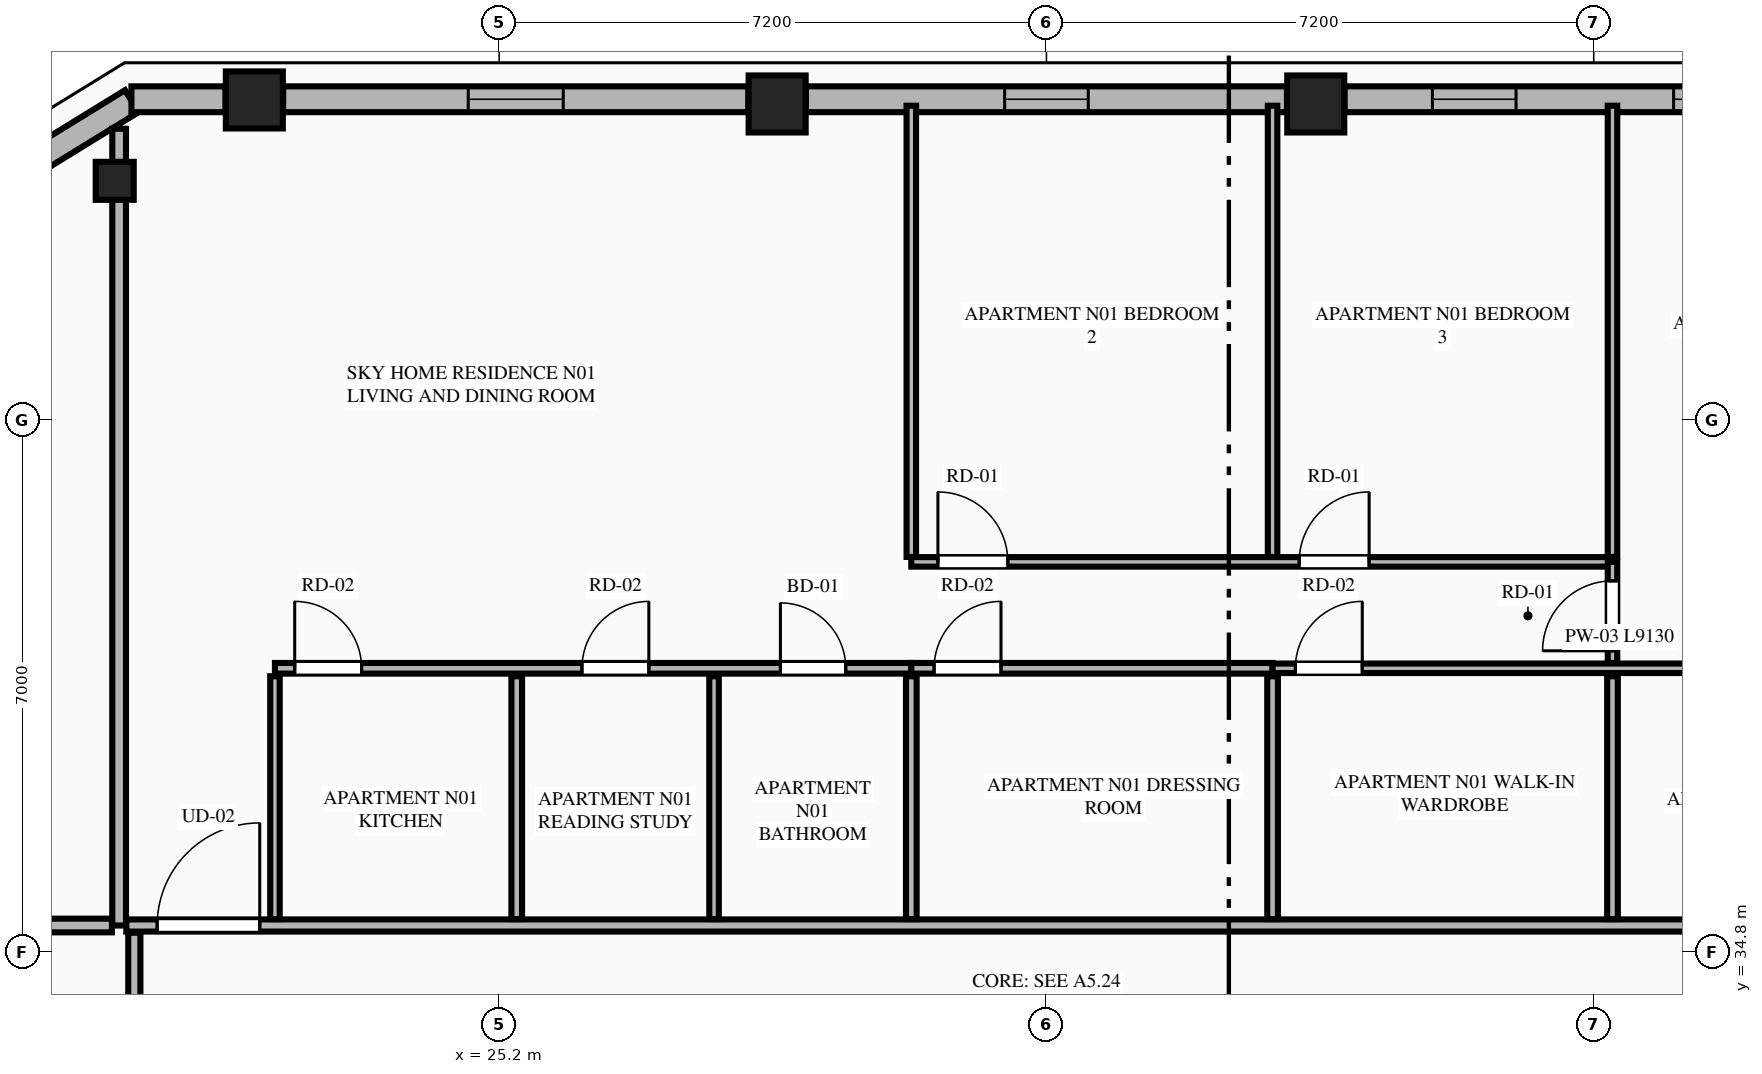
"""IFC4 building model, lengths in metres.
Left out: names, types, materials, properties, quantities, classifications, styles, units other than length and angle.
Written with IfcOpenShell. Run it as: python <this file> out.ifc"""

import sys

from ifc_helpers import new_model, si_unit, direction, frame, frame_2d, origin, origin_2d, place, context, subcontext, project, spatial, rectangle, extrude, element, fill, save


model = new_model("IFC4")
c1 = context("Model", 3, precision=1e-05, world=origin(), true_north=direction((0.0, 1.0)))
c2 = subcontext(c1, "Body", "Model", "MODEL_VIEW")
j1 = project(units=[si_unit("LENGTHUNIT", "METRE"), si_unit("PLANEANGLEUNIT", "RADIAN")], contexts=[c1])
p1 = place(None, origin())
s1 = spatial("IfcSite", under=j1, at=p1, CompositionType="ELEMENT")
p2 = place(p1, origin())
s2 = spatial("IfcBuilding", under=s1, at=p2, CompositionType="ELEMENT")
p3 = place(p2, frame((0.0, 0.0, 214.5)))
s3 = spatial("IfcBuildingStorey", under=s2, at=p3, CompositionType="ELEMENT", Elevation=214.5)
for number, where, z_axis, x_axis in (
    (1, (35.943, 45.958, 0.0), (0.0, 0.0, 1.0), (1.0, 0.0, 0.0)),
    (2, (28.857, 45.958, 0.0), (0.0, 0.0, 1.0), (1.0, 0.0, 0.0)),
    (3, (21.979, 46.011, 0.0), (0.0, 0.0, 1.0), (1.0, 0.0, 0.0)),
):
    element("IfcColumn", number, at=place(p3, frame(where, z_axis=z_axis, x_axis=x_axis)), inside=s3, PredefinedType="COLUMN", context=c2, shape_type="SweptSolid", body=[
        extrude(rectangle(XDim=0.75, YDim=0.75, at=origin_2d()), origin(), (0.0, 0.0, 1.0), 3.55),
    ])
p4 = place(p3, frame((20.142, 44.947, 0.0), z_axis=(0.0, 0.0, 1.0), x_axis=(-0.865230187018, -0.501374833306, 0.0)))
e4 = element("IfcColumn", 4, at=p4, inside=s3, PredefinedType="PILASTER", context=c2, shape_type="SweptSolid", body=[
    extrude(rectangle(XDim=0.5, YDim=0.35, at=origin_2d()), origin(), (0.0, 0.0, 1.0), 3.55),
])
p5 = place(p3, frame((20.367, 45.995, 0.0), z_axis=(0.0, 0.0, 1.0), x_axis=(-0.851713271379, -0.524008113828, 0.0)))
e5 = element("IfcWall", 5, at=p5, inside=s3, PredefinedType="STANDARD", context=c2, shape_type="SweptSolid", body=[
    extrude(rectangle(XDim=1.678, YDim=0.34, at=frame_2d((0.839, 0.0))), origin(), (0.0, 0.0, 1.0), 3.35),
])
p6 = place(p3, frame((42.442, 46.02, 0.0), z_axis=(0.0, 0.0, 1.0), x_axis=(-1.0, 0.0, 0.0)))
e6 = element("IfcWall", 6, at=p6, inside=s3, PredefinedType="STANDARD", context=c2, shape_type="SweptSolid", body=[
    extrude(rectangle(XDim=6.12, YDim=0.34, at=frame_2d((3.06, 0.0))), origin(), (0.0, 0.0, 1.0), 2.883),
])
p7 = place(p6, frame((0.691, 0.0, 0.75)))
e7 = element("IfcOpeningElement", 7, at=p7, cuts=e6, PredefinedType="OPENING", context=c2, shape_type="SweptSolid", body=[
    extrude(rectangle(XDim=1.1, YDim=1.983, at=frame_2d((0.55, 0.991))), frame((0.0, 0.18, 0.0), z_axis=(0.0, -1.0, 0.0), x_axis=(1.0, 0.0, 0.0)), (0.0, 0.0, 1.0), 0.36),
])
p8 = place(p6, frame((3.864, 0.0, 0.75)))
e8 = element("IfcOpeningElement", 8, at=p8, cuts=e6, PredefinedType="OPENING", context=c2, shape_type="SweptSolid", body=[
    extrude(rectangle(XDim=1.1, YDim=1.983, at=frame_2d((0.55, 0.991))), frame((0.0, 0.18, 0.0), z_axis=(0.0, -1.0, 0.0), x_axis=(1.0, 0.0, 0.0)), (0.0, 0.0, 1.0), 0.36),
])
p9 = place(p3, frame((35.564, 46.02, 0.0), z_axis=(0.0, 0.0, 1.0), x_axis=(-1.0, 0.0, 0.0)))
e9 = element("IfcWall", 9, at=p9, inside=s3, PredefinedType="STANDARD", context=c2, shape_type="SweptSolid", body=[
    extrude(rectangle(XDim=6.328, YDim=0.34, at=frame_2d((3.164, 0.0))), origin(), (0.0, 0.0, 1.0), 2.883),
])
p10 = place(p9, frame((2.614, 0.0, 0.75)))
e10 = element("IfcOpeningElement", 10, at=p10, cuts=e9, PredefinedType="OPENING", context=c2, shape_type="SweptSolid", body=[
    extrude(rectangle(XDim=1.1, YDim=1.983, at=frame_2d((0.55, 0.991))), frame((0.0, 0.18, 0.0), z_axis=(0.0, -1.0, 0.0), x_axis=(1.0, 0.0, 0.0)), (0.0, 0.0, 1.0), 0.36),
])
p11 = place(p3, frame((28.478, 46.02, 0.0), z_axis=(0.0, 0.0, 1.0), x_axis=(-1.0, 0.0, 0.0)))
e11 = element("IfcWall", 11, at=p11, inside=s3, PredefinedType="STANDARD", context=c2, shape_type="SweptSolid", body=[
    extrude(rectangle(XDim=6.12, YDim=0.34, at=frame_2d((3.06, 0.0))), origin(), (0.0, 0.0, 1.0), 2.883),
])
p12 = place(p11, frame((2.435, 0.0, 0.75)))
e12 = element("IfcOpeningElement", 12, at=p12, cuts=e11, PredefinedType="OPENING", context=c2, shape_type="SweptSolid", body=[
    extrude(rectangle(XDim=1.25, YDim=1.95, at=frame_2d((0.625, 0.975))), frame((0.0, 0.18, 0.0), z_axis=(0.0, -1.0, 0.0), x_axis=(1.0, 0.0, 0.0)), (0.0, 0.0, 1.0), 0.36),
])
p13 = place(p3, frame((21.6, 46.02, 0.0), z_axis=(0.0, 0.0, 1.0), x_axis=(-1.0, 0.0, 0.0)))
e13 = element("IfcWall", 13, at=p13, inside=s3, PredefinedType="STANDARD", context=c2, shape_type="SweptSolid", body=[
    extrude(rectangle(XDim=1.238, YDim=0.34, at=frame_2d((0.619, 0.0))), origin(), (0.0, 0.0, 1.0), 3.35),
])
p14 = place(p3, frame((20.2, 35.15, 0.0), z_axis=(0.0, 0.0, 1.0), x_axis=(0.0, 1.0, 0.0)))
e14 = element("IfcWall", 14, at=p14, inside=s3, PredefinedType="PARTITIONING", context=c2, shape_type="SweptSolid", body=[
    extrude(rectangle(XDim=10.482, YDim=0.18, at=frame_2d((5.241, 0.0))), origin(), (0.0, 0.0, 1.0), 3.35),
])
p15 = place(p3, frame((20.295, 35.15, 0.0), z_axis=(0.0, 0.0, 1.0), x_axis=(1.0, 0.0, 0.0)))
e15 = element("IfcWall", 15, at=p15, inside=s3, PredefinedType="PARTITIONING", context=c2, shape_type="SweptSolid", body=[
    extrude(rectangle(XDim=24.21, YDim=0.16, at=frame_2d((12.105, 0.0))), origin(), (0.0, 0.0, 1.0), 3.35),
])
p16 = place(p15, frame((0.405, 0.0, 0.0)))
e16 = element("IfcOpeningElement", 16, at=p16, cuts=e15, PredefinedType="OPENING", context=c2, shape_type="SweptSolid", body=[
    extrude(rectangle(XDim=1.35, YDim=2.35, at=frame_2d((0.675, 1.175))), frame((0.0, 0.09, 0.0), z_axis=(0.0, -1.0, 0.0), x_axis=(1.0, 0.0, 0.0)), (0.0, 0.0, 1.0), 0.18),
])
p17 = place(p3, frame((22.25, 35.235, 0.0), z_axis=(0.0, 0.0, 1.0), x_axis=(0.0, 1.0, 0.0)))
e17 = element("IfcWall", 17, at=p17, inside=s3, PredefinedType="PARTITIONING", context=c2, shape_type="SweptSolid", body=[
    extrude(rectangle(XDim=3.194, YDim=0.125, at=frame_2d((1.597, 0.0))), origin(), (0.0, 0.0, 1.0), 2.807),
])
p18 = place(p3, frame((22.25, 38.534, 0.0), z_axis=(0.0, 0.0, 1.0), x_axis=(1.0, 0.0, 0.0)))
e18 = element("IfcWall", 18, at=p18, inside=s3, PredefinedType="PLUMBINGWALL", context=c2, shape_type="SweptSolid", body=[
    extrude(rectangle(XDim=8.372, YDim=0.14, at=frame_2d((4.186, 0.0))), origin(), (0.0, 0.0, 1.0), 3.35),
])
p19 = place(p18, frame((6.65, 0.0, 0.0)))
e19 = element("IfcOpeningElement", 19, at=p19, cuts=e18, PredefinedType="OPENING", context=c2, shape_type="SweptSolid", body=[
    extrude(rectangle(XDim=0.86, YDim=2.1, at=frame_2d((0.43, 1.05))), frame((0.0, 0.08, 0.0), z_axis=(0.0, -1.0, 0.0), x_axis=(1.0, 0.0, 0.0)), (0.0, 0.0, 1.0), 0.16),
])
p20 = place(p18, frame((0.26, 0.0, 0.0)))
e20 = element("IfcOpeningElement", 20, at=p20, cuts=e18, PredefinedType="OPENING", context=c2, shape_type="SweptSolid", body=[
    extrude(rectangle(XDim=0.88, YDim=2.15, at=frame_2d((0.44, 1.075))), frame((0.0, 0.08, 0.0), z_axis=(0.0, -1.0, 0.0), x_axis=(1.0, 0.0, 0.0)), (0.0, 0.0, 1.0), 0.16),
])
p21 = place(p18, frame((4.039, 0.0, 0.0)))
e21 = element("IfcOpeningElement", 21, at=p21, cuts=e18, PredefinedType="OPENING", context=c2, shape_type="SweptSolid", body=[
    extrude(rectangle(XDim=0.88, YDim=2.15, at=frame_2d((0.44, 1.075))), frame((0.0, 0.08, 0.0), z_axis=(0.0, -1.0, 0.0), x_axis=(1.0, 0.0, 0.0)), (0.0, 0.0, 1.0), 0.16),
])
p22 = place(p3, frame((30.622, 38.534, 0.0), z_axis=(0.0, 0.0, 1.0), x_axis=(1.0, 0.0, 0.0)))
e22 = element("IfcWall", 22, at=p22, inside=s3, PredefinedType="PLUMBINGWALL", context=c2, shape_type="SweptSolid", body=[
    extrude(rectangle(XDim=4.753, YDim=0.14, at=frame_2d((2.376, 0.0))), origin(), (0.0, 0.0, 1.0), 3.35),
])
p23 = place(p22, frame((0.3, 0.0, 0.0)))
e23 = element("IfcOpeningElement", 23, at=p23, cuts=e22, PredefinedType="OPENING", context=c2, shape_type="SweptSolid", body=[
    extrude(rectangle(XDim=0.88, YDim=2.15, at=frame_2d((0.44, 1.075))), frame((0.0, 0.08, 0.0), z_axis=(0.0, -1.0, 0.0), x_axis=(1.0, 0.0, 0.0)), (0.0, 0.0, 1.0), 0.16),
])
p24 = place(p3, frame((35.375, 38.534, 0.0), z_axis=(0.0, 0.0, 1.0), x_axis=(1.0, 0.0, 0.0)))
e24 = element("IfcWall", 24, at=p24, inside=s3, PredefinedType="PARTITIONING", context=c2, shape_type="SweptSolid", body=[
    extrude(rectangle(XDim=9.13, YDim=0.125, at=frame_2d((4.565, 0.0))), origin(), (0.0, 0.0, 1.0), 3.35),
])
p25 = place(p24, frame((6.376, 0.0, 0.0)))
e25 = element("IfcOpeningElement", 25, at=p25, cuts=e24, PredefinedType="OPENING", context=c2, shape_type="SweptSolid", body=[
    extrude(rectangle(XDim=0.86, YDim=2.1, at=frame_2d((0.43, 1.05))), frame((0.0, 0.073, 0.0), z_axis=(0.0, -1.0, 0.0), x_axis=(1.0, 0.0, 0.0)), (0.0, 0.0, 1.0), 0.145),
])
p26 = place(p24, frame((0.3, 0.0, 0.0)))
e26 = element("IfcOpeningElement", 26, at=p26, cuts=e24, PredefinedType="OPENING", context=c2, shape_type="SweptSolid", body=[
    extrude(rectangle(XDim=0.88, YDim=2.15, at=frame_2d((0.44, 1.075))), frame((0.0, 0.073, 0.0), z_axis=(0.0, -1.0, 0.0), x_axis=(1.0, 0.0, 0.0)), (0.0, 0.0, 1.0), 0.145),
])
p27 = place(p3, frame((25.431, 35.235, 0.0), z_axis=(0.0, 0.0, 1.0), x_axis=(0.0, 1.0, 0.0)))
e27 = element("IfcWall", 27, at=p27, inside=s3, PredefinedType="PLUMBINGWALL", context=c2, shape_type="SweptSolid", body=[
    extrude(rectangle(XDim=3.194, YDim=0.14, at=frame_2d((1.597, 0.0))), origin(), (0.0, 0.0, 1.0), 3.35),
])
p28 = place(p3, frame((28.027, 35.235, 0.0), z_axis=(0.0, 0.0, 1.0), x_axis=(0.0, 1.0, 0.0)))
e28 = element("IfcWall", 28, at=p28, inside=s3, PredefinedType="PARTITIONING", context=c2, shape_type="SweptSolid", body=[
    extrude(rectangle(XDim=3.194, YDim=0.125, at=frame_2d((1.597, 0.0))), origin(), (0.0, 0.0, 1.0), 3.35),
])
p29 = place(p3, frame((30.622, 39.999, 0.0), z_axis=(0.0, 0.0, 1.0), x_axis=(0.0, 1.0, 0.0)))
e29 = element("IfcWall", 29, at=p29, inside=s3, PredefinedType="PARTITIONING", context=c2, shape_type="SweptSolid", body=[
    extrude(rectangle(XDim=5.936, YDim=0.125, at=frame_2d((2.968, 0.0))), origin(), (0.0, 0.0, 1.0), 3.35),
])
p30 = place(p3, frame((30.622, 39.934, 0.0), z_axis=(0.0, 0.0, 1.0), x_axis=(1.0, 0.0, 0.0)))
e30 = element("IfcWall", 30, at=p30, inside=s3, PredefinedType="PARTITIONING", context=c2, shape_type="SweptSolid", body=[
    extrude(rectangle(XDim=9.225, YDim=0.125, at=frame_2d((4.612, 0.0))), origin(), (0.0, 0.0, 1.0), 3.35),
])
p31 = place(p30, frame((0.35, 0.0, 0.0)))
e31 = element("IfcOpeningElement", 31, at=p31, cuts=e30, PredefinedType="OPENING", context=c2, shape_type="SweptSolid", body=[
    extrude(rectangle(XDim=0.92, YDim=2.15, at=frame_2d((0.46, 1.075))), frame((0.0, 0.073, 0.0), z_axis=(0.0, -1.0, 0.0), x_axis=(1.0, 0.0, 0.0)), (0.0, 0.0, 1.0), 0.145),
])
p32 = place(p30, frame((5.103, 0.0, 0.0)))
e32 = element("IfcOpeningElement", 32, at=p32, cuts=e30, PredefinedType="OPENING", context=c2, shape_type="SweptSolid", body=[
    extrude(rectangle(XDim=0.92, YDim=2.15, at=frame_2d((0.46, 1.075))), frame((0.0, 0.073, 0.0), z_axis=(0.0, -1.0, 0.0), x_axis=(1.0, 0.0, 0.0)), (0.0, 0.0, 1.0), 0.145),
])
p33 = place(p3, frame((39.847, 38.604, 0.0), z_axis=(0.0, 0.0, 1.0), x_axis=(0.0, 1.0, 0.0)))
e33 = element("IfcWall", 33, at=p33, inside=s3, PredefinedType="PARTITIONING", context=c2, shape_type="SweptSolid", body=[
    extrude(rectangle(XDim=1.33, YDim=0.125, at=frame_2d((0.665, 0.0))), origin(), (0.0, 0.0, 1.0), 3.35),
])
p34 = place(p33, frame((0.16, 0.0, 0.0)))
e34 = element("IfcOpeningElement", 34, at=p34, cuts=e33, PredefinedType="OPENING", context=c2, shape_type="SweptSolid", body=[
    extrude(rectangle(XDim=0.92, YDim=2.15, at=frame_2d((0.46, 1.075))), frame((0.0, 0.073, 0.0), z_axis=(0.0, -1.0, 0.0), x_axis=(1.0, 0.0, 0.0)), (0.0, 0.0, 1.0), 0.145),
])
for number, where, z_axis, x_axis in (
    (35, (30.622, 35.235, 0.0), (0.0, 0.0, 1.0), (0.0, 1.0, 0.0)),
    (36, (35.375, 35.235, 0.0), (0.0, 0.0, 1.0), (0.0, 1.0, 0.0)),
):
    element("IfcWall", number, at=place(p3, frame(where, z_axis=z_axis, x_axis=x_axis)), inside=s3, PredefinedType="PLUMBINGWALL", context=c2, shape_type="SweptSolid", body=[
        extrude(rectangle(XDim=3.194, YDim=0.14, at=frame_2d((1.597, 0.0))), origin(), (0.0, 0.0, 1.0), 3.35),
    ])
for number, where, z_axis, x_axis in (
    (37, (35.375, 39.999, 0.0), (0.0, 0.0, 1.0), (0.0, 1.0, 0.0)),
    (38, (39.847, 39.999, 0.0), (0.0, 0.0, 1.0), (0.0, 1.0, 0.0)),
):
    element("IfcWall", number, at=place(p3, frame(where, z_axis=z_axis, x_axis=x_axis)), inside=s3, PredefinedType="PARTITIONING", context=c2, shape_type="SweptSolid", body=[
        extrude(rectangle(XDim=5.936, YDim=0.125, at=frame_2d((2.968, 0.0))), origin(), (0.0, 0.0, 1.0), 3.35),
    ])
p35 = place(p3, frame((39.847, 35.235, 0.0), z_axis=(0.0, 0.0, 1.0), x_axis=(0.0, 1.0, 0.0)))
e39 = element("IfcWall", 39, at=p35, inside=s3, PredefinedType="PLUMBINGWALL", context=c2, shape_type="SweptSolid", body=[
    extrude(rectangle(XDim=3.194, YDim=0.14, at=frame_2d((1.597, 0.0))), origin(), (0.0, 0.0, 1.0), 3.35),
])
p36 = place(p3, frame((14.11, 35.15, 0.0), z_axis=(0.0, 0.0, 1.0), x_axis=(1.0, 0.0, 0.0)))
e40 = element("IfcWall", 40, at=p36, inside=s3, PredefinedType="PARTITIONING", context=c2, shape_type="SweptSolid", body=[
    extrude(rectangle(XDim=5.995, YDim=0.18, at=frame_2d((2.998, 0.0))), origin(), (0.0, 0.0, 1.0), 3.35),
])
p37 = place(p3, frame((20.4, 25.417, 0.0), z_axis=(0.0, 0.0, 1.0), x_axis=(0.0, 1.0, 0.0)))
e41 = element("IfcWall", 41, at=p37, inside=s3, PredefinedType="PARTITIONING", context=c2, shape_type="SweptSolid", body=[
    extrude(rectangle(XDim=9.638, YDim=0.16, at=frame_2d((4.819, 0.0))), origin(), (0.0, 0.0, 1.0), 3.35),
])
p38 = place(p37, frame((0.4, 0.0, 0.0)))
e42 = element("IfcOpeningElement", 42, at=p38, cuts=e41, PredefinedType="OPENING", context=c2, shape_type="SweptSolid", body=[
    extrude(rectangle(XDim=1.02, YDim=2.25, at=frame_2d((0.51, 1.125))), frame((0.0, 0.09, 0.0), z_axis=(0.0, -1.0, 0.0), x_axis=(1.0, 0.0, 0.0)), (0.0, 0.0, 1.0), 0.18),
])
p39 = place(p7, origin())
e43 = element("IfcWindow", 43, at=p39, inside=s3, PartitioningType="SINGLE_PANEL", PredefinedType="WINDOW", context=c2, shape_type="SweptSolid", body=[
    extrude(rectangle(XDim=1.1, YDim=1.983, at=frame_2d((0.55, 0.991))), frame((0.0, 0.03, 0.0), z_axis=(0.0, -1.0, 0.0), x_axis=(1.0, 0.0, 0.0)), (0.0, 0.0, 1.0), 0.06),
])
fill(e7, e43)
p40 = place(p10, origin())
e44 = element("IfcWindow", 44, at=p40, inside=s3, PartitioningType="SINGLE_PANEL", PredefinedType="WINDOW", context=c2, shape_type="SweptSolid", body=[
    extrude(rectangle(XDim=1.1, YDim=1.983, at=frame_2d((0.55, 0.991))), frame((0.0, 0.03, 0.0), z_axis=(0.0, -1.0, 0.0), x_axis=(1.0, 0.0, 0.0)), (0.0, 0.0, 1.0), 0.06),
])
fill(e10, e44)
p41 = place(p12, origin())
e45 = element("IfcWindow", 45, at=p41, inside=s3, PartitioningType="SINGLE_PANEL", PredefinedType="WINDOW", context=c2, shape_type="SweptSolid", body=[
    extrude(rectangle(XDim=1.25, YDim=1.95, at=frame_2d((0.625, 0.975))), frame((0.0, 0.03, 0.0), z_axis=(0.0, -1.0, 0.0), x_axis=(1.0, 0.0, 0.0)), (0.0, 0.0, 1.0), 0.06),
])
fill(e12, e45)
p42 = place(p19, origin())
e46 = element("IfcDoor", 46, at=p42, inside=s3, OperationType="SINGLE_SWING_LEFT", PredefinedType="DOOR", context=c2, shape_type="SweptSolid", body=[
    extrude(rectangle(XDim=0.86, YDim=2.1, at=frame_2d((0.43, 1.05))), frame((0.0, 0.025, 0.0), z_axis=(0.0, -1.0, 0.0), x_axis=(1.0, 0.0, 0.0)), (0.0, 0.0, 1.0), 0.05),
])
fill(e19, e46)
p43 = place(p16, origin())
e47 = element("IfcDoor", 47, at=p43, inside=s3, OperationType="SINGLE_SWING_RIGHT", PredefinedType="DOOR", context=c2, shape_type="SweptSolid", body=[
    extrude(rectangle(XDim=1.35, YDim=2.35, at=frame_2d((0.675, 1.175))), frame((0.0, 0.025, 0.0), z_axis=(0.0, -1.0, 0.0), x_axis=(1.0, 0.0, 0.0)), (0.0, 0.0, 1.0), 0.05),
])
fill(e16, e47)
p44 = place(p20, origin())
e48 = element("IfcDoor", 48, at=p44, inside=s3, OperationType="SINGLE_SWING_LEFT", PredefinedType="DOOR", context=c2, shape_type="SweptSolid", body=[
    extrude(rectangle(XDim=0.88, YDim=2.15, at=frame_2d((0.44, 1.075))), frame((0.0, 0.025, 0.0), z_axis=(0.0, -1.0, 0.0), x_axis=(1.0, 0.0, 0.0)), (0.0, 0.0, 1.0), 0.05),
])
fill(e20, e48)
p45 = place(p21, origin())
e49 = element("IfcDoor", 49, at=p45, inside=s3, OperationType="SINGLE_SWING_RIGHT", PredefinedType="DOOR", context=c2, shape_type="SweptSolid", body=[
    extrude(rectangle(XDim=0.88, YDim=2.15, at=frame_2d((0.44, 1.075))), frame((0.0, 0.025, 0.0), z_axis=(0.0, -1.0, 0.0), x_axis=(1.0, 0.0, 0.0)), (0.0, 0.0, 1.0), 0.05),
])
fill(e21, e49)
p46 = place(p23, origin())
e50 = element("IfcDoor", 50, at=p46, inside=s3, OperationType="SINGLE_SWING_RIGHT", PredefinedType="DOOR", context=c2, shape_type="SweptSolid", body=[
    extrude(rectangle(XDim=0.88, YDim=2.15, at=frame_2d((0.44, 1.075))), frame((0.0, 0.025, 0.0), z_axis=(0.0, -1.0, 0.0), x_axis=(1.0, 0.0, 0.0)), (0.0, 0.0, 1.0), 0.05),
])
fill(e23, e50)
p47 = place(p31, origin())
e51 = element("IfcDoor", 51, at=p47, inside=s3, OperationType="SINGLE_SWING_LEFT", PredefinedType="DOOR", context=c2, shape_type="SweptSolid", body=[
    extrude(rectangle(XDim=0.92, YDim=2.15, at=frame_2d((0.46, 1.075))), frame((0.0, 0.025, 0.0), z_axis=(0.0, -1.0, 0.0), x_axis=(1.0, 0.0, 0.0)), (0.0, 0.0, 1.0), 0.05),
])
fill(e31, e51)
p48 = place(p32, origin())
e52 = element("IfcDoor", 52, at=p48, inside=s3, OperationType="SINGLE_SWING_RIGHT", PredefinedType="DOOR", context=c2, shape_type="SweptSolid", body=[
    extrude(rectangle(XDim=0.92, YDim=2.15, at=frame_2d((0.46, 1.075))), frame((0.0, 0.025, 0.0), z_axis=(0.0, -1.0, 0.0), x_axis=(1.0, 0.0, 0.0)), (0.0, 0.0, 1.0), 0.05),
])
fill(e32, e52)
p49 = place(p34, origin())
e53 = element("IfcDoor", 53, at=p49, inside=s3, OperationType="SINGLE_SWING_LEFT", PredefinedType="DOOR", context=c2, shape_type="SweptSolid", body=[
    extrude(rectangle(XDim=0.92, YDim=2.15, at=frame_2d((0.46, 1.075))), frame((0.0, 0.025, 0.0), z_axis=(0.0, -1.0, 0.0), x_axis=(1.0, 0.0, 0.0)), (0.0, 0.0, 1.0), 0.05),
])
fill(e34, e53)
p50 = place(p26, origin())
e54 = element("IfcDoor", 54, at=p50, inside=s3, OperationType="SINGLE_SWING_RIGHT", PredefinedType="DOOR", context=c2, shape_type="SweptSolid", body=[
    extrude(rectangle(XDim=0.88, YDim=2.15, at=frame_2d((0.44, 1.075))), frame((0.0, 0.025, 0.0), z_axis=(0.0, -1.0, 0.0), x_axis=(1.0, 0.0, 0.0)), (0.0, 0.0, 1.0), 0.05),
])
fill(e26, e54)
p51 = place(p8, origin())
e55 = element("IfcWindow", 55, at=p51, inside=s3, PartitioningType="SINGLE_PANEL", PredefinedType="WINDOW", context=c2, shape_type="SweptSolid", body=[
    extrude(rectangle(XDim=1.1, YDim=1.983, at=frame_2d((0.55, 0.991))), frame((0.0, 0.03, 0.0), z_axis=(0.0, -1.0, 0.0), x_axis=(1.0, 0.0, 0.0)), (0.0, 0.0, 1.0), 0.06),
])
fill(e8, e55)
save(model, sys.argv[1])
